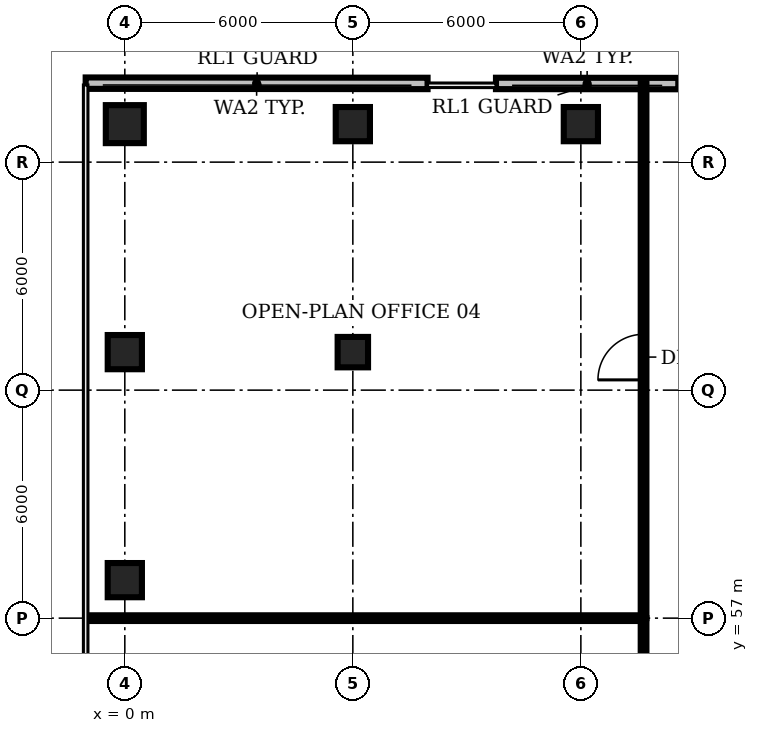
"""IFC4 building model, lengths in metres.
Left out: names, types, materials, properties, quantities, classifications, styles, units other than length and angle.
Written with IfcOpenShell. Run it as: python <this file> out.ifc"""

import sys

from ifc_helpers import new_model, si_unit, direction, frame, frame_2d, origin, origin_2d, place, context, subcontext, project, spatial, rectangle, circle, extrude, element, fill, save


model = new_model("IFC4")
c1 = context("Model", 3, precision=1e-05, world=origin(), true_north=direction((0.0, 1.0)))
c2 = subcontext(c1, "Body", "Model", "MODEL_VIEW")
j1 = project(units=[si_unit("LENGTHUNIT", "METRE"), si_unit("PLANEANGLEUNIT", "RADIAN")], contexts=[c1])
p1 = place(None, origin())
s1 = spatial("IfcSite", under=j1, at=p1, CompositionType="ELEMENT")
p2 = place(p1, origin())
s2 = spatial("IfcBuilding", under=s1, at=p2, CompositionType="ELEMENT")
p3 = place(p2, frame((0.0, 0.0, 113.0)))
s3 = spatial("IfcBuildingStorey", under=s2, at=p3, CompositionType="ELEMENT", Elevation=113.0)
for number, where, z_axis, x_axis in (
    (1, (0.0, 58.0, 0.0), (0.0, 0.0, 1.0), (1.0, 0.0, 0.0)),
    (2, (0.0, 64.0, 0.0), (0.0, 0.0, 1.0), (1.0, 0.0, 0.0)),
):
    element("IfcColumn", number, at=place(p3, frame(where, z_axis=z_axis, x_axis=x_axis)), inside=s3, PredefinedType="COLUMN", context=c2, shape_type="SweptSolid", body=[
        extrude(rectangle(XDim=0.9, YDim=0.9, at=origin_2d()), origin(), (0.0, 0.0, 1.0), 3.85),
    ])
p4 = place(p3, frame((0.0, 70.0, 0.0), z_axis=(0.0, 0.0, 1.0), x_axis=(1.0, 0.0, 0.0)))
e3 = element("IfcColumn", 3, at=p4, inside=s3, PredefinedType="COLUMN", context=c2, shape_type="SweptSolid", body=[
    extrude(circle(Radius=0.5, at=origin_2d()), origin(), (0.0, 0.0, 1.0), 3.85),
])
p5 = place(p3, frame((6.0, 64.0, 0.0), z_axis=(0.0, 0.0, 1.0), x_axis=(1.0, 0.0, 0.0)))
e4 = element("IfcColumn", 4, at=p5, inside=s3, PredefinedType="COLUMN", context=c2, shape_type="SweptSolid", body=[
    extrude(rectangle(XDim=0.8, YDim=0.8, at=origin_2d()), origin(), (0.0, 0.0, 1.0), 3.85),
])
for number, where, z_axis, x_axis in (
    (5, (6.0, 70.0, 0.0), (0.0, 0.0, 1.0), (1.0, 0.0, 0.0)),
    (6, (12.0, 70.0, 0.0), (0.0, 0.0, 1.0), (1.0, 0.0, 0.0)),
):
    element("IfcColumn", number, at=place(p3, frame(where, z_axis=z_axis, x_axis=x_axis)), inside=s3, PredefinedType="COLUMN", context=c2, shape_type="SweptSolid", body=[
        extrude(rectangle(XDim=0.9, YDim=0.9, at=origin_2d()), origin(), (0.0, 0.0, 1.0), 3.85),
    ])
p6 = place(p3, frame((14.564, 71.067, 0.0), z_axis=(0.0, 0.0, 1.0), x_axis=(-0.999999668533, 0.000814207658, 0.0)))
e7 = element("IfcWall", 7, at=p6, inside=s3, PredefinedType="SOLIDWALL", context=c2, shape_type="SweptSolid", body=[
    extrude(rectangle(XDim=4.798, YDim=0.3, at=frame_2d((2.399, 0.0))), origin(), (0.0, 0.0, 1.0), 3.85),
])
p7 = place(p3, frame((7.966, 71.071, 0.0), z_axis=(0.0, 0.0, 1.0), x_axis=(-0.999999668594, 0.000814133085, 0.0)))
e8 = element("IfcWall", 8, at=p7, inside=s3, PredefinedType="SOLIDWALL", context=c2, shape_type="SweptSolid", body=[
    extrude(rectangle(XDim=8.996, YDim=0.3, at=frame_2d((4.498, 0.0))), origin(), (0.0, 0.0, 1.0), 3.85),
])
p8 = place(p3, frame((-0.98, 57.0, 0.0), z_axis=(0.0, 0.0, 1.0), x_axis=(1.0, 0.0, 0.0)))
e9 = element("IfcWall", 9, at=p8, inside=s3, PredefinedType="PARTITIONING", context=c2, shape_type="SweptSolid", body=[
    extrude(rectangle(XDim=14.63, YDim=0.15, at=frame_2d((7.315, 0.0))), origin(), (0.0, 0.0, 1.0), 2.83),
])
p9 = place(p3, frame((13.65, 51.0, 0.0), z_axis=(0.0, 0.0, 1.0), x_axis=(0.0, 1.0, 0.0)))
e10 = element("IfcWall", 10, at=p9, inside=s3, PredefinedType="PARTITIONING", context=c2, shape_type="SweptSolid", body=[
    extrude(rectangle(XDim=6.0, YDim=0.15, at=frame_2d((3.0, 0.0))), origin(), (0.0, 0.0, 1.0), 2.83),
])
p10 = place(p9, frame((2.4, 0.0, 0.0)))
e11 = element("IfcOpeningElement", 11, at=p10, cuts=e10, PredefinedType="OPENING", context=c2, shape_type="SweptSolid", body=[
    extrude(rectangle(XDim=1.0, YDim=2.1, at=frame_2d((0.5, 1.05))), frame((0.0, 0.085, 0.0), z_axis=(0.0, -1.0, 0.0), x_axis=(1.0, 0.0, 0.0)), (0.0, 0.0, 1.0), 0.17),
])
p11 = place(p3, frame((13.65, 57.0, 0.0), z_axis=(0.0, 0.0, 1.0), x_axis=(0.0, 1.0, 0.0)))
e12 = element("IfcWall", 12, at=p11, inside=s3, PredefinedType="PARTITIONING", context=c2, shape_type="SweptSolid", body=[
    extrude(rectangle(XDim=14.078, YDim=0.15, at=frame_2d((7.039, 0.0))), origin(), (0.0, 0.0, 1.0), 2.83),
])
p12 = place(p11, frame((6.27, 0.0, 0.0)))
e13 = element("IfcOpeningElement", 13, at=p12, cuts=e12, PredefinedType="OPENING", context=c2, shape_type="SweptSolid", body=[
    extrude(rectangle(XDim=1.2, YDim=2.1, at=frame_2d((0.6, 1.05))), frame((0.0, 0.085, 0.0), z_axis=(0.0, -1.0, 0.0), x_axis=(1.0, 0.0, 0.0)), (0.0, 0.0, 1.0), 0.17),
])
p13 = place(p12, origin())
e14 = element("IfcDoor", 14, at=p13, inside=s3, OperationType="SINGLE_SWING_LEFT", PredefinedType="DOOR", context=c2, shape_type="SweptSolid", body=[
    extrude(rectangle(XDim=1.2, YDim=2.1, at=frame_2d((0.6, 1.05))), frame((0.0, 0.025, 0.0), z_axis=(0.0, -1.0, 0.0), x_axis=(1.0, 0.0, 0.0)), (0.0, 0.0, 1.0), 0.05),
])
fill(e13, e14)
save(model, sys.argv[1])
